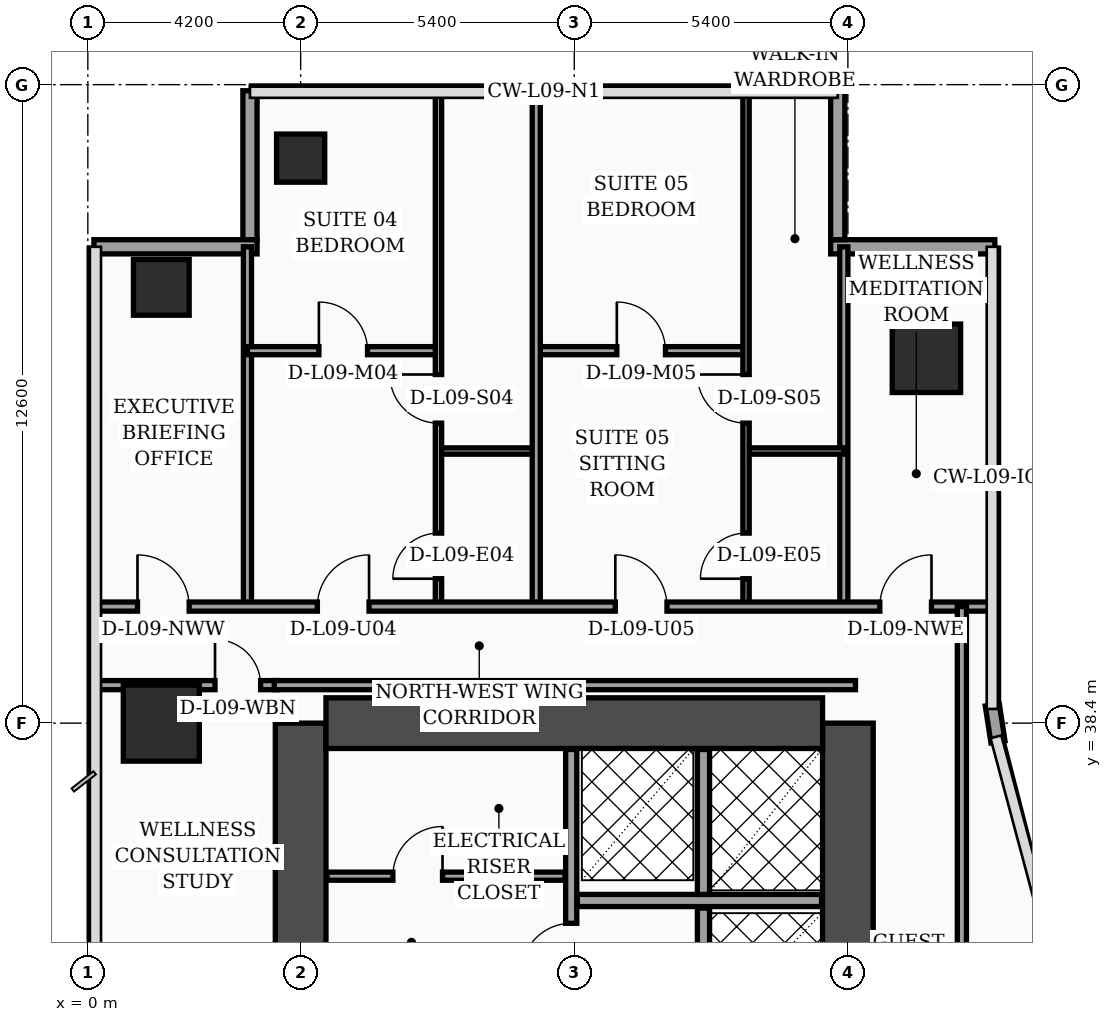
"""IFC4 building model, lengths in metres.
Left out: names, types, materials, properties, quantities, classifications, styles, units other than length and angle.
Written with IfcOpenShell. Run it as: python <this file> out.ifc"""

import sys

from ifc_helpers import new_model, si_unit, direction, frame, frame_2d, origin, origin_2d, place, context, subcontext, project, spatial, rectangle, hollow_rectangle, extrude, element, fill, save


model = new_model("IFC4")
c1 = context("Model", 3, precision=1e-05, world=origin(), true_north=direction((0.0, 1.0)))
c2 = subcontext(c1, "Body", "Model", "MODEL_VIEW")
j1 = project(units=[si_unit("LENGTHUNIT", "METRE"), si_unit("PLANEANGLEUNIT", "RADIAN")], contexts=[c1])
p1 = place(None, origin())
s1 = spatial("IfcSite", under=j1, at=p1, CompositionType="ELEMENT")
p2 = place(p1, origin())
s2 = spatial("IfcBuilding", under=s1, at=p2, CompositionType="ELEMENT")
p3 = place(p2, frame((0.0, 0.0, 42.2)))
s3 = spatial("IfcBuildingStorey", under=s2, at=p3, CompositionType="ELEMENT", Elevation=42.2)
p4 = place(p3, frame((4.2, 16.8, 0.0), z_axis=(0.0, 0.0, 1.0), x_axis=(0.0, 1.0, 0.0)))
e1 = element("IfcWall", 1, at=p4, inside=s3, PredefinedType="SHEAR", context=c2, shape_type="SweptSolid", body=[
    extrude(rectangle(XDim=21.6, YDim=1.0, at=frame_2d((10.8, 0.0))), origin(), (0.0, 0.0, 1.0), 3.52),
])
p5 = place(p3, frame((15.0, 16.8, 0.0), z_axis=(0.0, 0.0, 1.0), x_axis=(0.0, 1.0, 0.0)))
e2 = element("IfcWall", 2, at=p5, inside=s3, PredefinedType="SHEAR", context=c2, shape_type="SweptSolid", body=[
    extrude(rectangle(XDim=21.6, YDim=1.0, at=frame_2d((10.8, 0.0))), origin(), (0.0, 0.0, 1.0), 3.52),
])
p6 = place(p5, frame((8.65, 0.0, 0.0)))
e3 = element("IfcOpeningElement", 3, at=p6, cuts=e2, PredefinedType="OPENING", context=c2, shape_type="SweptSolid", body=[
    extrude(rectangle(XDim=1.1, YDim=2.2, at=frame_2d((0.55, 1.1))), frame((0.0, 0.51, 0.0), z_axis=(0.0, -1.0, 0.0), x_axis=(1.0, 0.0, 0.0)), (0.0, 0.0, 1.0), 1.02),
])
p7 = place(p5, frame((1.25, 0.0, 0.0)))
e4 = element("IfcOpeningElement", 4, at=p7, cuts=e2, PredefinedType="OPENING", context=c2, shape_type="SweptSolid", body=[
    extrude(rectangle(XDim=1.1, YDim=2.2, at=frame_2d((0.55, 1.1))), frame((0.0, 0.51, 0.0), z_axis=(0.0, -1.0, 0.0), x_axis=(1.0, 0.0, 0.0)), (0.0, 0.0, 1.0), 1.02),
])
p8 = place(p5, frame((3.8, 0.0, 0.0)))
e5 = element("IfcOpeningElement", 5, at=p8, cuts=e2, PredefinedType="OPENING", context=c2, shape_type="SweptSolid", body=[
    extrude(rectangle(XDim=1.1, YDim=2.2, at=frame_2d((0.55, 1.1))), frame((0.0, 0.51, 0.0), z_axis=(0.0, -1.0, 0.0), x_axis=(1.0, 0.0, 0.0)), (0.0, 0.0, 1.0), 1.02),
])
p9 = place(p5, frame((6.35, 0.0, 0.0)))
e6 = element("IfcOpeningElement", 6, at=p9, cuts=e2, PredefinedType="OPENING", context=c2, shape_type="SweptSolid", body=[
    extrude(rectangle(XDim=1.1, YDim=2.2, at=frame_2d((0.55, 1.1))), frame((0.0, 0.51, 0.0), z_axis=(0.0, -1.0, 0.0), x_axis=(1.0, 0.0, 0.0)), (0.0, 0.0, 1.0), 1.02),
])
p10 = place(p3, frame((4.7, 38.4, 0.0), z_axis=(0.0, 0.0, 1.0), x_axis=(1.0, 0.0, 0.0)))
e7 = element("IfcWall", 7, at=p10, inside=s3, PredefinedType="SHEAR", context=c2, shape_type="SweptSolid", body=[
    extrude(rectangle(XDim=9.8, YDim=1.0, at=frame_2d((4.9, 0.0))), origin(), (0.0, 0.0, 1.0), 3.52),
])
p11 = place(p3, frame((1.45, 38.4, 0.0), z_axis=(0.0, 0.0, 1.0), x_axis=(1.0, 0.0, 0.0)))
e8 = element("IfcColumn", 8, at=p11, inside=s3, PredefinedType="COLUMN", context=c2, shape_type="SweptSolid", body=[
    extrude(rectangle(XDim=1.5, YDim=1.5, at=origin_2d()), origin(), (0.0, 0.0, 1.0), 3.52),
])
p12 = place(p3, frame((1.45, 47.0, 0.0), z_axis=(0.0, 0.0, 1.0), x_axis=(1.0, 0.0, 0.0)))
e9 = element("IfcColumn", 9, at=p12, inside=s3, PredefinedType="COLUMN", context=c2, shape_type="SweptSolid", body=[
    extrude(hollow_rectangle(XDim=1.1, YDim=1.1, WallThickness=0.045, at=origin_2d()), origin(), (0.0, 0.0, 1.0), 3.52),
])
p13 = place(p3, frame((4.2, 49.55, 0.0), z_axis=(0.0, 0.0, 1.0), x_axis=(1.0, 0.0, 0.0)))
e10 = element("IfcColumn", 10, at=p13, inside=s3, PredefinedType="COLUMN", context=c2, shape_type="SweptSolid", body=[
    extrude(hollow_rectangle(XDim=0.95, YDim=0.95, WallThickness=0.04, at=origin_2d()), origin(), (0.0, 0.0, 1.0), 3.52),
])
p14 = place(p3, frame((16.55, 45.6, 0.0), z_axis=(0.0, 0.0, 1.0), x_axis=(1.0, 0.0, 0.0)))
e11 = element("IfcColumn", 11, at=p14, inside=s3, PredefinedType="COLUMN", context=c2, shape_type="SweptSolid", body=[
    extrude(rectangle(XDim=1.35, YDim=1.35, at=origin_2d()), origin(), (0.0, 0.0, 1.0), 3.52),
])
p15 = place(p3, frame((17.962, 38.03, 0.0), z_axis=(0.0, 0.0, 1.0), x_axis=(-0.15141125477, 0.988470855377, 0.0)))
e12 = element("IfcWall", 12, at=p15, inside=s3, PredefinedType="SOLIDWALL", context=c2, shape_type="SweptSolid", body=[
    extrude(rectangle(XDim=0.739, YDim=0.28, at=frame_2d((0.369, 0.0))), origin(), (0.0, 0.0, 1.0), 3.52),
])
p16 = place(p3, frame((17.9, 47.8, 0.0), z_axis=(0.0, 0.0, 1.0), x_axis=(-1.0, 0.0, 0.0)))
e13 = element("IfcWall", 13, at=p16, inside=s3, PredefinedType="SOLIDWALL", context=c2, shape_type="SweptSolid", body=[
    extrude(rectangle(XDim=3.24, YDim=0.28, at=frame_2d((1.62, 0.0))), origin(), (0.0, 0.0, 1.0), 3.52),
])
p17 = place(p3, frame((14.8, 47.94, 0.0), z_axis=(0.0, 0.0, 1.0), x_axis=(0.0, 1.0, 0.0)))
e14 = element("IfcWall", 14, at=p17, inside=s3, PredefinedType="SOLIDWALL", context=c2, shape_type="SweptSolid", body=[
    extrude(rectangle(XDim=2.94, YDim=0.28, at=frame_2d((1.47, 0.0))), origin(), (0.0, 0.0, 1.0), 3.52),
])
p18 = place(p3, frame((3.2, 50.88, 0.0), z_axis=(0.0, 0.0, 1.0), x_axis=(0.0, -1.0, 0.0)))
e15 = element("IfcWall", 15, at=p18, inside=s3, PredefinedType="SOLIDWALL", context=c2, shape_type="SweptSolid", body=[
    extrude(rectangle(XDim=2.94, YDim=0.28, at=frame_2d((1.47, 0.0))), origin(), (0.0, 0.0, 1.0), 3.02),
])
p19 = place(p3, frame((3.34, 47.8, 0.0), z_axis=(0.0, 0.0, 1.0), x_axis=(-1.0, 0.0, 0.0)))
e16 = element("IfcWall", 16, at=p19, inside=s3, PredefinedType="SOLIDWALL", context=c2, shape_type="SweptSolid", body=[
    extrude(rectangle(XDim=3.22, YDim=0.28, at=frame_2d((1.61, 0.0))), origin(), (0.0, 0.0, 1.0), 3.02),
])
p20 = place(p3, frame((4.72, 35.38, 0.0), z_axis=(0.0, 0.0, 1.0), x_axis=(1.0, 0.0, 0.0)))
e17 = element("IfcWall", 17, at=p20, inside=s3, PredefinedType="PARTITIONING", context=c2, shape_type="SweptSolid", body=[
    extrude(rectangle(XDim=4.7, YDim=0.16, at=frame_2d((2.35, 0.0))), origin(), (0.0, 0.0, 1.0), 3.52),
])
p21 = place(p20, frame((1.3, 0.0, 0.0)))
e18 = element("IfcOpeningElement", 18, at=p21, cuts=e17, PredefinedType="OPENING", context=c2, shape_type="SweptSolid", body=[
    extrude(rectangle(XDim=0.98, YDim=2.15, at=frame_2d((0.49, 1.075))), frame((0.0, 0.09, 0.0), z_axis=(0.0, -1.0, 0.0), x_axis=(1.0, 0.0, 0.0)), (0.0, 0.0, 1.0), 0.18),
])
p22 = place(p3, frame((9.54, 32.92, 0.0), z_axis=(0.0, 0.0, 1.0), x_axis=(0.0, 1.0, 0.0)))
e19 = element("IfcWall", 19, at=p22, inside=s3, PredefinedType="SOLIDWALL", context=c2, shape_type="SweptSolid", body=[
    extrude(rectangle(XDim=4.96, YDim=0.22, at=frame_2d((2.48, 0.0))), origin(), (0.0, 0.0, 1.0), 3.52),
])
p23 = place(p22, frame((0.55, 0.0, 0.0)))
e20 = element("IfcOpeningElement", 20, at=p23, cuts=e19, PredefinedType="OPENING", context=c2, shape_type="SweptSolid", body=[
    extrude(rectangle(XDim=0.98, YDim=2.15, at=frame_2d((0.49, 1.075))), frame((0.0, 0.12, 0.0), z_axis=(0.0, -1.0, 0.0), x_axis=(1.0, 0.0, 0.0)), (0.0, 0.0, 1.0), 0.24),
])
p24 = place(p3, frame((12.15, 27.0, 0.0), z_axis=(0.0, 0.0, 1.0), x_axis=(0.0, 1.0, 0.0)))
e21 = element("IfcWall", 21, at=p24, inside=s3, PredefinedType="SOLIDWALL", context=c2, shape_type="SweptSolid", body=[
    extrude(rectangle(XDim=7.75, YDim=0.24, at=frame_2d((3.875, 0.0))), origin(), (0.0, 0.0, 1.0), 3.52),
])
p25 = place(p3, frame((9.66, 34.9, 0.0), z_axis=(0.0, 0.0, 1.0), x_axis=(1.0, 0.0, 0.0)))
e22 = element("IfcWall", 22, at=p25, inside=s3, PredefinedType="SOLIDWALL", context=c2, shape_type="SweptSolid", body=[
    extrude(rectangle(XDim=4.82, YDim=0.24, at=frame_2d((2.41, 0.0))), origin(), (0.0, 0.0, 1.0), 3.52),
])
p26 = place(p3, frame((12.15, 35.02, 0.0), z_axis=(0.0, 0.0, 1.0), x_axis=(0.0, 1.0, 0.0)))
e23 = element("IfcWall", 23, at=p26, inside=s3, PredefinedType="SOLIDWALL", context=c2, shape_type="SweptSolid", body=[
    extrude(rectangle(XDim=2.86, YDim=0.24, at=frame_2d((1.43, 0.0))), origin(), (0.0, 0.0, 1.0), 3.52),
])
p27 = place(p3, frame((0.08, 39.15, 0.0), z_axis=(0.0, 0.0, 1.0), x_axis=(1.0, 0.0, 0.0)))
e24 = element("IfcWall", 24, at=p27, inside=s3, PredefinedType="PARTITIONING", context=c2, shape_type="SweptSolid", body=[
    extrude(rectangle(XDim=3.65, YDim=0.18, at=frame_2d((1.825, 0.0))), origin(), (0.0, 0.0, 1.0), 2.82),
])
p28 = place(p27, frame((2.43, 0.0, 0.0)))
e25 = element("IfcOpeningElement", 25, at=p28, cuts=e24, PredefinedType="OPENING", context=c2, shape_type="SweptSolid", body=[
    extrude(rectangle(XDim=0.9, YDim=2.15, at=frame_2d((0.45, 1.075))), frame((0.0, 0.1, 0.0), z_axis=(0.0, -1.0, 0.0), x_axis=(1.0, 0.0, 0.0)), (0.0, 0.0, 1.0), 0.2),
])
p29 = place(p3, frame((3.15, 40.7, 0.0), z_axis=(0.0, 0.0, 1.0), x_axis=(0.0, 1.0, 0.0)))
e26 = element("IfcWall", 26, at=p29, inside=s3, PredefinedType="PARTITIONING", context=c2, shape_type="SweptSolid", body=[
    extrude(rectangle(XDim=7.1, YDim=0.16, at=frame_2d((3.55, 0.0))), origin(), (0.0, 0.0, 1.0), 3.12),
])
p30 = place(p3, frame((14.92, 40.7, 0.0), z_axis=(0.0, 0.0, 1.0), x_axis=(0.0, 1.0, 0.0)))
e27 = element("IfcWall", 27, at=p30, inside=s3, PredefinedType="PARTITIONING", context=c2, shape_type="SweptSolid", body=[
    extrude(rectangle(XDim=7.1, YDim=0.16, at=frame_2d((3.55, 0.0))), origin(), (0.0, 0.0, 1.0), 3.02),
])
p31 = place(p3, frame((6.92, 43.77, 0.0), z_axis=(0.0, 0.0, 1.0), x_axis=(1.0, 0.0, 0.0)))
e28 = element("IfcWall", 28, at=p31, inside=s3, PredefinedType="PARTITIONING", context=c2, shape_type="SweptSolid", body=[
    extrude(rectangle(XDim=1.93, YDim=0.125, at=frame_2d((0.965, 0.0))), origin(), (0.0, 0.0, 1.0), 3.52),
])
p32 = place(p3, frame((3.15, 45.75, 0.0), z_axis=(0.0, 0.0, 1.0), x_axis=(1.0, 0.0, 0.0)))
e29 = element("IfcWall", 29, at=p32, inside=s3, PredefinedType="PARTITIONING", context=c2, shape_type="SweptSolid", body=[
    extrude(rectangle(XDim=3.77, YDim=0.16, at=frame_2d((1.885, 0.0))), origin(), (0.0, 0.0, 1.0), 2.82),
])
p33 = place(p32, frame((1.41, 0.0, 0.0)))
e30 = element("IfcOpeningElement", 30, at=p33, cuts=e29, PredefinedType="OPENING", context=c2, shape_type="SweptSolid", body=[
    extrude(rectangle(XDim=0.96, YDim=2.2, at=frame_2d((0.48, 1.1))), frame((0.0, 0.09, 0.0), z_axis=(0.0, -1.0, 0.0), x_axis=(1.0, 0.0, 0.0)), (0.0, 0.0, 1.0), 0.18),
])
p34 = place(p3, frame((6.92, 40.7, 0.0), z_axis=(0.0, 0.0, 1.0), x_axis=(0.0, 1.0, 0.0)))
e31 = element("IfcWall", 31, at=p34, inside=s3, PredefinedType="PARTITIONING", context=c2, shape_type="SweptSolid", body=[
    extrude(rectangle(XDim=10.24, YDim=0.125, at=frame_2d((5.12, 0.0))), origin(), (0.0, 0.0, 1.0), 3.02),
])
p35 = place(p34, frame((0.55, 0.0, 0.0)))
e32 = element("IfcOpeningElement", 32, at=p35, cuts=e31, PredefinedType="OPENING", context=c2, shape_type="SweptSolid", body=[
    extrude(rectangle(XDim=0.9, YDim=2.15, at=frame_2d((0.45, 1.075))), frame((0.0, 0.073, 0.0), z_axis=(0.0, -1.0, 0.0), x_axis=(1.0, 0.0, 0.0)), (0.0, 0.0, 1.0), 0.145),
])
p36 = place(p34, frame((3.62, 0.0, 0.0)))
e33 = element("IfcOpeningElement", 33, at=p36, cuts=e31, PredefinedType="OPENING", context=c2, shape_type="SweptSolid", body=[
    extrude(rectangle(XDim=0.96, YDim=2.2, at=frame_2d((0.48, 1.1))), frame((0.0, 0.073, 0.0), z_axis=(0.0, -1.0, 0.0), x_axis=(1.0, 0.0, 0.0)), (0.0, 0.0, 1.0), 0.145),
])
p37 = place(p3, frame((12.99, 43.77, 0.0), z_axis=(0.0, 0.0, 1.0), x_axis=(1.0, 0.0, 0.0)))
e34 = element("IfcWall", 34, at=p37, inside=s3, PredefinedType="PARTITIONING", context=c2, shape_type="SweptSolid", body=[
    extrude(rectangle(XDim=1.93, YDim=0.125, at=frame_2d((0.965, 0.0))), origin(), (0.0, 0.0, 1.0), 3.52),
])
p38 = place(p3, frame((8.85, 45.75, 0.0), z_axis=(0.0, 0.0, 1.0), x_axis=(1.0, 0.0, 0.0)))
e35 = element("IfcWall", 35, at=p38, inside=s3, PredefinedType="PARTITIONING", context=c2, shape_type="SweptSolid", body=[
    extrude(rectangle(XDim=4.14, YDim=0.16, at=frame_2d((2.07, 0.0))), origin(), (0.0, 0.0, 1.0), 3.52),
])
p39 = place(p38, frame((1.59, 0.0, 0.0)))
e36 = element("IfcOpeningElement", 36, at=p39, cuts=e35, PredefinedType="OPENING", context=c2, shape_type="SweptSolid", body=[
    extrude(rectangle(XDim=0.96, YDim=2.2, at=frame_2d((0.48, 1.1))), frame((0.0, 0.09, 0.0), z_axis=(0.0, -1.0, 0.0), x_axis=(1.0, 0.0, 0.0)), (0.0, 0.0, 1.0), 0.18),
])
p40 = place(p3, frame((12.99, 40.7, 0.0), z_axis=(0.0, 0.0, 1.0), x_axis=(0.0, 1.0, 0.0)))
e37 = element("IfcWall", 37, at=p40, inside=s3, PredefinedType="PARTITIONING", context=c2, shape_type="SweptSolid", body=[
    extrude(rectangle(XDim=10.24, YDim=0.125, at=frame_2d((5.12, 0.0))), origin(), (0.0, 0.0, 1.0), 3.02),
])
p41 = place(p40, frame((0.55, 0.0, 0.0)))
e38 = element("IfcOpeningElement", 38, at=p41, cuts=e37, PredefinedType="OPENING", context=c2, shape_type="SweptSolid", body=[
    extrude(rectangle(XDim=0.9, YDim=2.15, at=frame_2d((0.45, 1.075))), frame((0.0, 0.073, 0.0), z_axis=(0.0, -1.0, 0.0), x_axis=(1.0, 0.0, 0.0)), (0.0, 0.0, 1.0), 0.145),
])
p42 = place(p40, frame((3.62, 0.0, 0.0)))
e39 = element("IfcOpeningElement", 39, at=p42, cuts=e37, PredefinedType="OPENING", context=c2, shape_type="SweptSolid", body=[
    extrude(rectangle(XDim=0.96, YDim=2.2, at=frame_2d((0.48, 1.1))), frame((0.0, 0.073, 0.0), z_axis=(0.0, -1.0, 0.0), x_axis=(1.0, 0.0, 0.0)), (0.0, 0.0, 1.0), 0.145),
])
p43 = place(p3, frame((8.85, 40.7, 0.0), z_axis=(0.0, 0.0, 1.0), x_axis=(0.0, 1.0, 0.0)))
e40 = element("IfcWall", 40, at=p43, inside=s3, PredefinedType="PARTITIONING", context=c2, shape_type="SweptSolid", body=[
    extrude(rectangle(XDim=10.24, YDim=0.16, at=frame_2d((5.12, 0.0))), origin(), (0.0, 0.0, 1.0), 3.02),
])
p44 = place(p3, frame((0.08, 40.7, 0.0), z_axis=(0.0, 0.0, 1.0), x_axis=(1.0, 0.0, 0.0)))
e41 = element("IfcWall", 41, at=p44, inside=s3, PredefinedType="PARTITIONING", context=c2, shape_type="SweptSolid", body=[
    extrude(rectangle(XDim=17.77, YDim=0.18, at=frame_2d((8.885, 0.0))), origin(), (0.0, 0.0, 1.0), 2.82),
])
p45 = place(p44, frame((0.9, 0.0, 0.0)))
e42 = element("IfcOpeningElement", 42, at=p45, cuts=e41, PredefinedType="OPENING", context=c2, shape_type="SweptSolid", body=[
    extrude(rectangle(XDim=1.02, YDim=2.2, at=frame_2d((0.51, 1.1))), frame((0.0, 0.1, 0.0), z_axis=(0.0, -1.0, 0.0), x_axis=(1.0, 0.0, 0.0)), (0.0, 0.0, 1.0), 0.2),
])
p46 = place(p44, frame((4.45, 0.0, 0.0)))
e43 = element("IfcOpeningElement", 43, at=p46, cuts=e41, PredefinedType="OPENING", context=c2, shape_type="SweptSolid", body=[
    extrude(rectangle(XDim=1.02, YDim=2.2, at=frame_2d((0.51, 1.1))), frame((0.0, 0.1, 0.0), z_axis=(0.0, -1.0, 0.0), x_axis=(1.0, 0.0, 0.0)), (0.0, 0.0, 1.0), 0.2),
])
p47 = place(p44, frame((10.33, 0.0, 0.0)))
e44 = element("IfcOpeningElement", 44, at=p47, cuts=e41, PredefinedType="OPENING", context=c2, shape_type="SweptSolid", body=[
    extrude(rectangle(XDim=1.02, YDim=2.2, at=frame_2d((0.51, 1.1))), frame((0.0, 0.1, 0.0), z_axis=(0.0, -1.0, 0.0), x_axis=(1.0, 0.0, 0.0)), (0.0, 0.0, 1.0), 0.2),
])
p48 = place(p44, frame((15.55, 0.0, 0.0)))
e45 = element("IfcOpeningElement", 45, at=p48, cuts=e41, PredefinedType="OPENING", context=c2, shape_type="SweptSolid", body=[
    extrude(rectangle(XDim=1.02, YDim=2.2, at=frame_2d((0.51, 1.1))), frame((0.0, 0.1, 0.0), z_axis=(0.0, -1.0, 0.0), x_axis=(1.0, 0.0, 0.0)), (0.0, 0.0, 1.0), 0.2),
])
p49 = place(p3, frame((17.25, 24.3, 0.0), z_axis=(0.0, 0.0, 1.0), x_axis=(0.0, 1.0, 0.0)))
e46 = element("IfcWall", 46, at=p49, inside=s3, PredefinedType="PARTITIONING", context=c2, shape_type="SweptSolid", body=[
    extrude(rectangle(XDim=16.4, YDim=0.18, at=frame_2d((8.2, 0.0))), origin(), (0.0, 0.0, 1.0), 2.82),
])
p50 = place(p3, frame((3.68, 39.15, 0.0), z_axis=(0.0, 0.0, 1.0), x_axis=(1.0, 0.0, 0.0)))
e47 = element("IfcWall", 47, at=p50, inside=s3, PredefinedType="PARTITIONING", context=c2, shape_type="SweptSolid", body=[
    extrude(rectangle(XDim=11.47, YDim=0.18, at=frame_2d((5.735, 0.0))), origin(), (0.0, 0.0, 1.0), 2.82),
])
p51 = place(p21, origin())
e48 = element("IfcDoor", 48, at=p51, inside=s3, OperationType="SINGLE_SWING_RIGHT", PredefinedType="DOOR", context=c2, shape_type="SweptSolid", body=[
    extrude(rectangle(XDim=0.98, YDim=2.15, at=frame_2d((0.49, 1.075))), frame((0.0, 0.025, 0.0), z_axis=(0.0, -1.0, 0.0), x_axis=(1.0, 0.0, 0.0)), (0.0, 0.0, 1.0), 0.05),
])
fill(e18, e48)
p52 = place(p23, origin())
e49 = element("IfcDoor", 49, at=p52, inside=s3, OperationType="SINGLE_SWING_LEFT", PredefinedType="DOOR", context=c2, shape_type="SweptSolid", body=[
    extrude(rectangle(XDim=0.98, YDim=2.15, at=frame_2d((0.49, 1.075))), frame((0.0, 0.025, 0.0), z_axis=(0.0, -1.0, 0.0), x_axis=(1.0, 0.0, 0.0)), (0.0, 0.0, 1.0), 0.05),
])
fill(e20, e49)
p53 = place(p28, origin())
e50 = element("IfcDoor", 50, at=p53, inside=s3, OperationType="SINGLE_SWING_LEFT", PredefinedType="DOOR", context=c2, shape_type="SweptSolid", body=[
    extrude(rectangle(XDim=0.9, YDim=2.15, at=frame_2d((0.45, 1.075))), frame((0.0, 0.025, 0.0), z_axis=(0.0, -1.0, 0.0), x_axis=(1.0, 0.0, 0.0)), (0.0, 0.0, 1.0), 0.05),
])
fill(e25, e50)
p54 = place(p33, origin())
e51 = element("IfcDoor", 51, at=p54, inside=s3, OperationType="SINGLE_SWING_LEFT", PredefinedType="DOOR", context=c2, shape_type="SweptSolid", body=[
    extrude(rectangle(XDim=0.96, YDim=2.2, at=frame_2d((0.48, 1.1))), frame((0.0, 0.025, 0.0), z_axis=(0.0, -1.0, 0.0), x_axis=(1.0, 0.0, 0.0)), (0.0, 0.0, 1.0), 0.05),
])
fill(e30, e51)
p55 = place(p35, origin())
e52 = element("IfcDoor", 52, at=p55, inside=s3, OperationType="SINGLE_SWING_LEFT", PredefinedType="DOOR", context=c2, shape_type="SweptSolid", body=[
    extrude(rectangle(XDim=0.9, YDim=2.15, at=frame_2d((0.45, 1.075))), frame((0.0, 0.025, 0.0), z_axis=(0.0, -1.0, 0.0), x_axis=(1.0, 0.0, 0.0)), (0.0, 0.0, 1.0), 0.05),
])
fill(e32, e52)
p56 = place(p36, origin())
e53 = element("IfcDoor", 53, at=p56, inside=s3, OperationType="SINGLE_SWING_RIGHT", PredefinedType="DOOR", context=c2, shape_type="SweptSolid", body=[
    extrude(rectangle(XDim=0.96, YDim=2.2, at=frame_2d((0.48, 1.1))), frame((0.0, 0.025, 0.0), z_axis=(0.0, -1.0, 0.0), x_axis=(1.0, 0.0, 0.0)), (0.0, 0.0, 1.0), 0.05),
])
fill(e33, e53)
p57 = place(p39, origin())
e54 = element("IfcDoor", 54, at=p57, inside=s3, OperationType="SINGLE_SWING_LEFT", PredefinedType="DOOR", context=c2, shape_type="SweptSolid", body=[
    extrude(rectangle(XDim=0.96, YDim=2.2, at=frame_2d((0.48, 1.1))), frame((0.0, 0.025, 0.0), z_axis=(0.0, -1.0, 0.0), x_axis=(1.0, 0.0, 0.0)), (0.0, 0.0, 1.0), 0.05),
])
fill(e36, e54)
p58 = place(p41, origin())
e55 = element("IfcDoor", 55, at=p58, inside=s3, OperationType="SINGLE_SWING_LEFT", PredefinedType="DOOR", context=c2, shape_type="SweptSolid", body=[
    extrude(rectangle(XDim=0.9, YDim=2.15, at=frame_2d((0.45, 1.075))), frame((0.0, 0.025, 0.0), z_axis=(0.0, -1.0, 0.0), x_axis=(1.0, 0.0, 0.0)), (0.0, 0.0, 1.0), 0.05),
])
fill(e38, e55)
p59 = place(p42, origin())
e56 = element("IfcDoor", 56, at=p59, inside=s3, OperationType="SINGLE_SWING_RIGHT", PredefinedType="DOOR", context=c2, shape_type="SweptSolid", body=[
    extrude(rectangle(XDim=0.96, YDim=2.2, at=frame_2d((0.48, 1.1))), frame((0.0, 0.025, 0.0), z_axis=(0.0, -1.0, 0.0), x_axis=(1.0, 0.0, 0.0)), (0.0, 0.0, 1.0), 0.05),
])
fill(e39, e56)
p60 = place(p45, origin())
e57 = element("IfcDoor", 57, at=p60, inside=s3, OperationType="SINGLE_SWING_LEFT", PredefinedType="DOOR", context=c2, shape_type="SweptSolid", body=[
    extrude(rectangle(XDim=1.02, YDim=2.2, at=frame_2d((0.51, 1.1))), frame((0.0, 0.025, 0.0), z_axis=(0.0, -1.0, 0.0), x_axis=(1.0, 0.0, 0.0)), (0.0, 0.0, 1.0), 0.05),
])
fill(e42, e57)
p61 = place(p46, origin())
e58 = element("IfcDoor", 58, at=p61, inside=s3, OperationType="SINGLE_SWING_RIGHT", PredefinedType="DOOR", context=c2, shape_type="SweptSolid", body=[
    extrude(rectangle(XDim=1.02, YDim=2.2, at=frame_2d((0.51, 1.1))), frame((0.0, 0.025, 0.0), z_axis=(0.0, -1.0, 0.0), x_axis=(1.0, 0.0, 0.0)), (0.0, 0.0, 1.0), 0.05),
])
fill(e43, e58)
p62 = place(p47, origin())
e59 = element("IfcDoor", 59, at=p62, inside=s3, OperationType="SINGLE_SWING_LEFT", PredefinedType="DOOR", context=c2, shape_type="SweptSolid", body=[
    extrude(rectangle(XDim=1.02, YDim=2.2, at=frame_2d((0.51, 1.1))), frame((0.0, 0.025, 0.0), z_axis=(0.0, -1.0, 0.0), x_axis=(1.0, 0.0, 0.0)), (0.0, 0.0, 1.0), 0.05),
])
fill(e44, e59)
p63 = place(p48, origin())
e60 = element("IfcDoor", 60, at=p63, inside=s3, OperationType="SINGLE_SWING_RIGHT", PredefinedType="DOOR", context=c2, shape_type="SweptSolid", body=[
    extrude(rectangle(XDim=1.02, YDim=2.2, at=frame_2d((0.51, 1.1))), frame((0.0, 0.025, 0.0), z_axis=(0.0, -1.0, 0.0), x_axis=(1.0, 0.0, 0.0)), (0.0, 0.0, 1.0), 0.05),
])
fill(e45, e60)
save(model, sys.argv[1])
